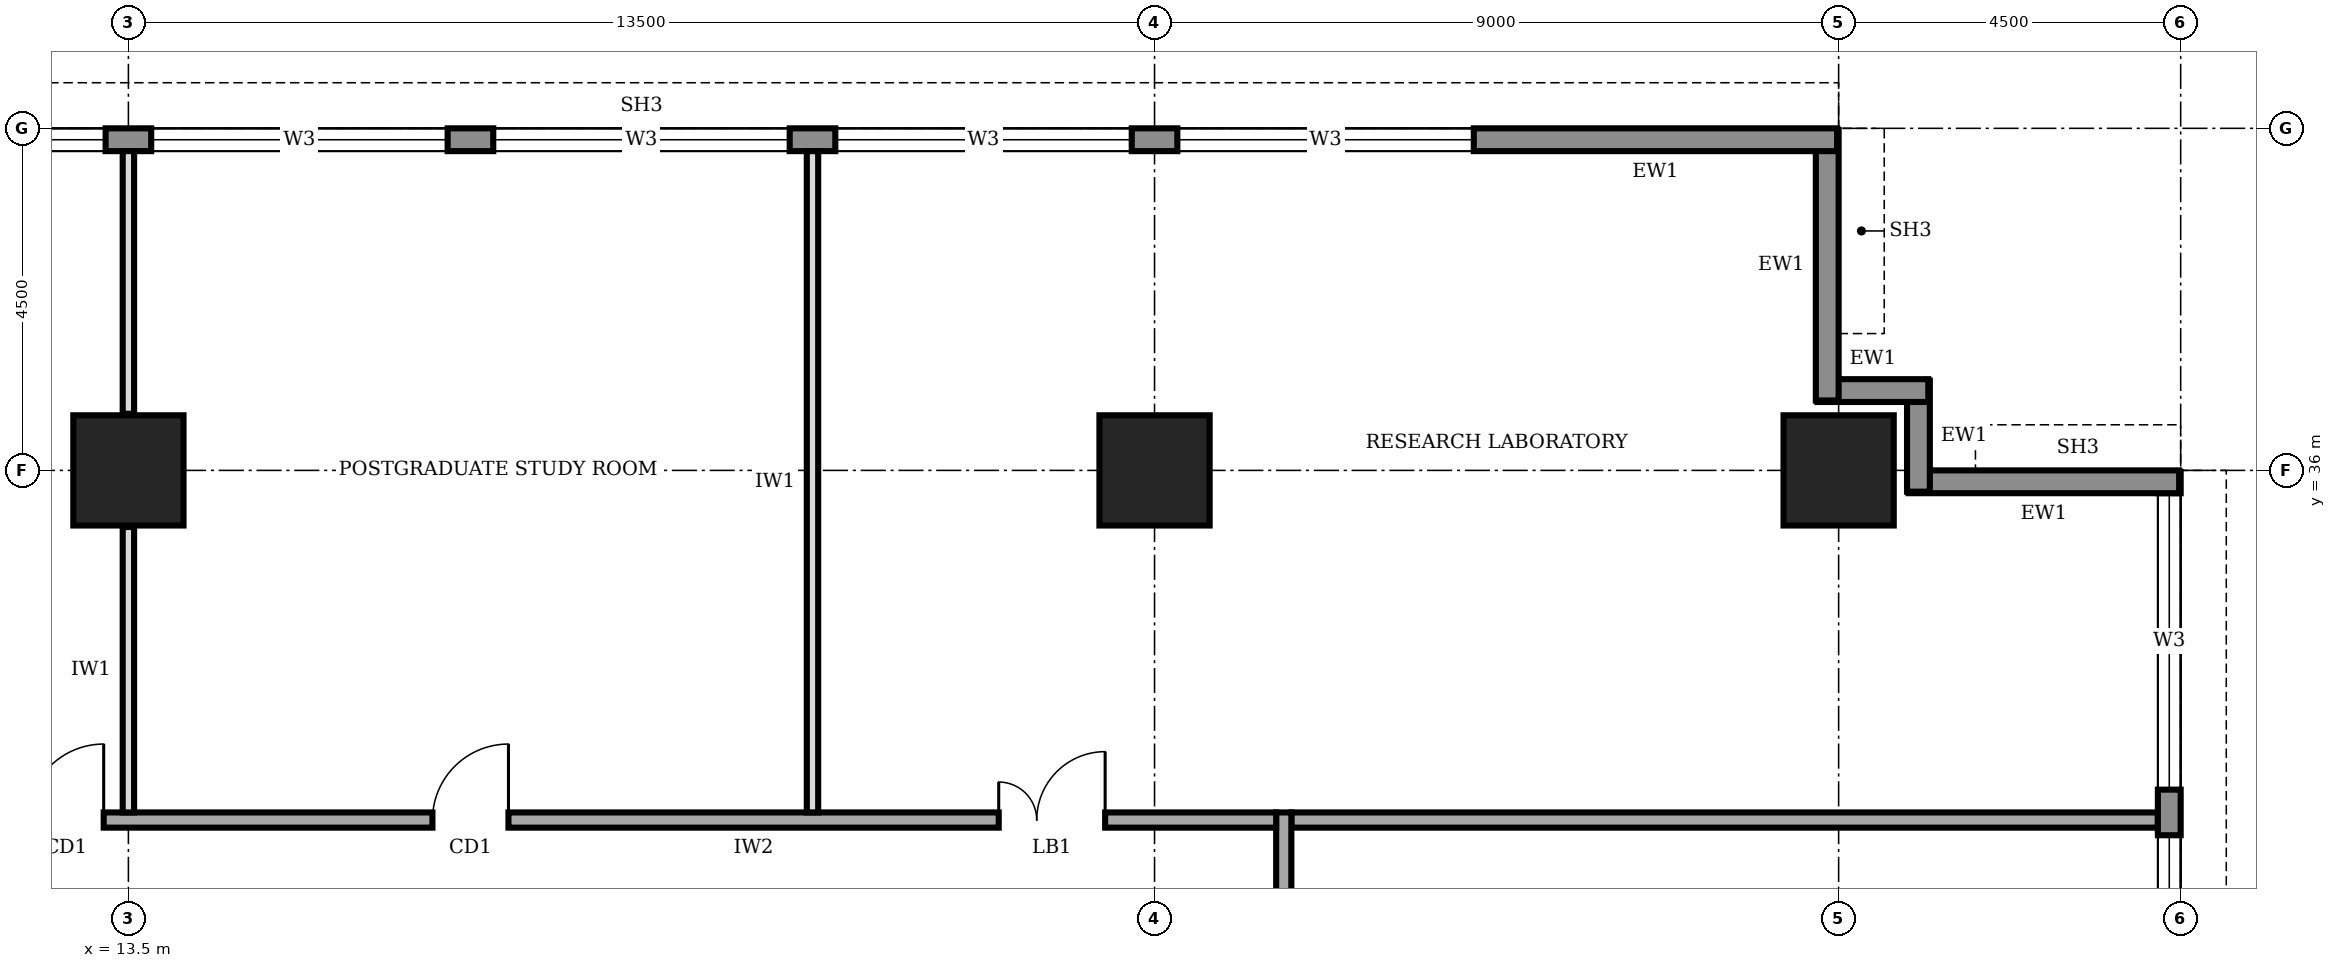
"""IFC4 building model, lengths in metres.
Left out: names, types, materials, properties, quantities, classifications, styles, units other than length and angle.
Written with IfcOpenShell. Run it as: python <this file> out.ifc"""

import sys

from ifc_helpers import new_model, si_unit, direction, frame, frame_2d, origin, origin_2d, place, context, subcontext, project, spatial, rectangle, extrude, element, fill, save


model = new_model("IFC4")
c1 = context("Model", 3, precision=1e-05, world=origin(), true_north=direction((0.0, 1.0)))
c2 = subcontext(c1, "Body", "Model", "MODEL_VIEW")
j1 = project(units=[si_unit("LENGTHUNIT", "METRE"), si_unit("PLANEANGLEUNIT", "RADIAN")], contexts=[c1])
p1 = place(None, origin())
s1 = spatial("IfcSite", under=j1, at=p1, CompositionType="ELEMENT")
p2 = place(p1, origin())
s2 = spatial("IfcBuilding", under=s1, at=p2, CompositionType="ELEMENT")
p3 = place(p2, frame((0.0, 0.0, 253.0)))
s3 = spatial("IfcBuildingStorey", under=s2, at=p3, CompositionType="ELEMENT", Elevation=253.0)
for number, where, z_axis, x_axis in (
    (1, (13.5, 36.0, 0.0), (0.0, 0.0, 1.0), (1.0, 0.0, 0.0)),
    (2, (27.0, 36.0, 0.0), (0.0, 0.0, 1.0), (1.0, 0.0, 0.0)),
    (3, (36.0, 36.0, 0.0), (0.0, 0.0, 1.0), (1.0, 0.0, 0.0)),
):
    element("IfcColumn", number, at=place(p3, frame(where, z_axis=z_axis, x_axis=x_axis)), inside=s3, PredefinedType="COLUMN", context=c2, shape_type="SweptSolid", body=[
        extrude(rectangle(XDim=1.45, YDim=1.45, at=origin_2d()), origin(), (0.0, 0.0, 1.0), 4.0),
    ])
p4 = place(p3, frame((40.35, 4.52, 0.0), z_axis=(0.0, 0.0, 1.0), x_axis=(0.0, 1.0, 0.0)))
e4 = element("IfcWall", 4, at=p4, inside=s3, PredefinedType="STANDARD", context=c2, shape_type="SweptSolid", body=[
    extrude(rectangle(XDim=31.46, YDim=0.3, at=frame_2d((15.73, 0.0))), origin(), (0.0, 0.0, 1.0), 3.75),
])
p5 = place(p4, frame((4.78, 0.0, 0.95)))
e5 = element("IfcOpeningElement", 5, at=p5, cuts=e4, PredefinedType="OPENING", context=c2, shape_type="SweptSolid", body=[
    extrude(rectangle(XDim=3.9, YDim=1.8, at=frame_2d((1.95, 0.9))), frame((0.0, 0.16, 0.0), z_axis=(0.0, -1.0, 0.0), x_axis=(1.0, 0.0, 0.0)), (0.0, 0.0, 1.0), 0.32),
])
p6 = place(p4, frame((9.28, 0.0, 0.95)))
e6 = element("IfcOpeningElement", 6, at=p6, cuts=e4, PredefinedType="OPENING", context=c2, shape_type="SweptSolid", body=[
    extrude(rectangle(XDim=3.9, YDim=1.8, at=frame_2d((1.95, 0.9))), frame((0.0, 0.16, 0.0), z_axis=(0.0, -1.0, 0.0), x_axis=(1.0, 0.0, 0.0)), (0.0, 0.0, 1.0), 0.32),
])
p7 = place(p4, frame((13.78, 0.0, 0.95)))
e7 = element("IfcOpeningElement", 7, at=p7, cuts=e4, PredefinedType="OPENING", context=c2, shape_type="SweptSolid", body=[
    extrude(rectangle(XDim=3.9, YDim=1.8, at=frame_2d((1.95, 0.9))), frame((0.0, 0.16, 0.0), z_axis=(0.0, -1.0, 0.0), x_axis=(1.0, 0.0, 0.0)), (0.0, 0.0, 1.0), 0.32),
])
p8 = place(p4, frame((18.28, 0.0, 0.95)))
e8 = element("IfcOpeningElement", 8, at=p8, cuts=e4, PredefinedType="OPENING", context=c2, shape_type="SweptSolid", body=[
    extrude(rectangle(XDim=3.9, YDim=1.8, at=frame_2d((1.95, 0.9))), frame((0.0, 0.16, 0.0), z_axis=(0.0, -1.0, 0.0), x_axis=(1.0, 0.0, 0.0)), (0.0, 0.0, 1.0), 0.32),
])
p9 = place(p4, frame((22.78, 0.0, 0.95)))
e9 = element("IfcOpeningElement", 9, at=p9, cuts=e4, PredefinedType="OPENING", context=c2, shape_type="SweptSolid", body=[
    extrude(rectangle(XDim=3.9, YDim=1.8, at=frame_2d((1.95, 0.9))), frame((0.0, 0.16, 0.0), z_axis=(0.0, -1.0, 0.0), x_axis=(1.0, 0.0, 0.0)), (0.0, 0.0, 1.0), 0.32),
])
p10 = place(p4, frame((27.28, 0.0, 0.95)))
e10 = element("IfcOpeningElement", 10, at=p10, cuts=e4, PredefinedType="OPENING", context=c2, shape_type="SweptSolid", body=[
    extrude(rectangle(XDim=3.9, YDim=1.8, at=frame_2d((1.95, 0.9))), frame((0.0, 0.16, 0.0), z_axis=(0.0, -1.0, 0.0), x_axis=(1.0, 0.0, 0.0)), (0.0, 0.0, 1.0), 0.32),
])
p11 = place(p3, frame((40.48, 35.85, 0.0), z_axis=(0.0, 0.0, 1.0), x_axis=(-1.0, 0.0, 0.0)))
e11 = element("IfcWall", 11, at=p11, inside=s3, PredefinedType="STANDARD", context=c2, shape_type="SweptSolid", body=[
    extrude(rectangle(XDim=3.56, YDim=0.3, at=frame_2d((1.78, 0.0))), origin(), (0.0, 0.0, 1.0), 2.85),
])
for number, where, z_axis, x_axis in (
    (12, (37.05, 35.72, 0.0), (0.0, 0.0, 1.0), (0.0, 1.0, 0.0)),
    (13, (37.18, 37.05, 0.0), (0.0, 0.0, 1.0), (-1.0, 0.0, 0.0)),
):
    element("IfcWall", number, at=place(p3, frame(where, z_axis=z_axis, x_axis=x_axis)), inside=s3, PredefinedType="STANDARD", context=c2, shape_type="SweptSolid", body=[
        extrude(rectangle(XDim=1.46, YDim=0.3, at=frame_2d((0.73, 0.0))), origin(), (0.0, 0.0, 1.0), 3.75),
    ])
p12 = place(p3, frame((35.85, 36.92, 0.0), z_axis=(0.0, 0.0, 1.0), x_axis=(0.0, 1.0, 0.0)))
e14 = element("IfcWall", 14, at=p12, inside=s3, PredefinedType="STANDARD", context=c2, shape_type="SweptSolid", body=[
    extrude(rectangle(XDim=3.56, YDim=0.3, at=frame_2d((1.78, 0.0))), origin(), (0.0, 0.0, 1.0), 2.85),
])
p13 = place(p3, frame((35.98, 40.35, 0.0), z_axis=(0.0, 0.0, 1.0), x_axis=(-1.0, 0.0, 0.0)))
e15 = element("IfcWall", 15, at=p13, inside=s3, PredefinedType="STANDARD", context=c2, shape_type="SweptSolid", body=[
    extrude(rectangle(XDim=31.46, YDim=0.3, at=frame_2d((15.73, 0.0))), origin(), (0.0, 0.0, 1.0), 3.75),
])
p14 = place(p13, frame((27.28, 0.0, 0.95)))
e16 = element("IfcOpeningElement", 16, at=p14, cuts=e15, PredefinedType="OPENING", context=c2, shape_type="SweptSolid", body=[
    extrude(rectangle(XDim=3.9, YDim=1.8, at=frame_2d((1.95, 0.9))), frame((0.0, 0.16, 0.0), z_axis=(0.0, -1.0, 0.0), x_axis=(1.0, 0.0, 0.0)), (0.0, 0.0, 1.0), 0.32),
])
p15 = place(p13, frame((22.78, 0.0, 0.95)))
e17 = element("IfcOpeningElement", 17, at=p15, cuts=e15, PredefinedType="OPENING", context=c2, shape_type="SweptSolid", body=[
    extrude(rectangle(XDim=3.9, YDim=1.8, at=frame_2d((1.95, 0.9))), frame((0.0, 0.16, 0.0), z_axis=(0.0, -1.0, 0.0), x_axis=(1.0, 0.0, 0.0)), (0.0, 0.0, 1.0), 0.32),
])
p16 = place(p13, frame((18.28, 0.0, 0.95)))
e18 = element("IfcOpeningElement", 18, at=p16, cuts=e15, PredefinedType="OPENING", context=c2, shape_type="SweptSolid", body=[
    extrude(rectangle(XDim=3.9, YDim=1.8, at=frame_2d((1.95, 0.9))), frame((0.0, 0.16, 0.0), z_axis=(0.0, -1.0, 0.0), x_axis=(1.0, 0.0, 0.0)), (0.0, 0.0, 1.0), 0.32),
])
p17 = place(p13, frame((13.78, 0.0, 0.95)))
e19 = element("IfcOpeningElement", 19, at=p17, cuts=e15, PredefinedType="OPENING", context=c2, shape_type="SweptSolid", body=[
    extrude(rectangle(XDim=3.9, YDim=1.8, at=frame_2d((1.95, 0.9))), frame((0.0, 0.16, 0.0), z_axis=(0.0, -1.0, 0.0), x_axis=(1.0, 0.0, 0.0)), (0.0, 0.0, 1.0), 0.32),
])
p18 = place(p13, frame((9.28, 0.0, 0.95)))
e20 = element("IfcOpeningElement", 20, at=p18, cuts=e15, PredefinedType="OPENING", context=c2, shape_type="SweptSolid", body=[
    extrude(rectangle(XDim=3.9, YDim=1.8, at=frame_2d((1.95, 0.9))), frame((0.0, 0.16, 0.0), z_axis=(0.0, -1.0, 0.0), x_axis=(1.0, 0.0, 0.0)), (0.0, 0.0, 1.0), 0.32),
])
p19 = place(p13, frame((4.78, 0.0, 0.95)))
e21 = element("IfcOpeningElement", 21, at=p19, cuts=e15, PredefinedType="OPENING", context=c2, shape_type="SweptSolid", body=[
    extrude(rectangle(XDim=3.9, YDim=1.8, at=frame_2d((1.95, 0.9))), frame((0.0, 0.16, 0.0), z_axis=(0.0, -1.0, 0.0), x_axis=(1.0, 0.0, 0.0)), (0.0, 0.0, 1.0), 0.32),
])
p20 = place(p3, frame((28.7, 9.2, 0.0), z_axis=(0.0, 0.0, 1.0), x_axis=(0.0, 1.0, 0.0)))
e22 = element("IfcWall", 22, at=p20, inside=s3, PredefinedType="SOLIDWALL", context=c2, shape_type="SweptSolid", body=[
    extrude(rectangle(XDim=22.3, YDim=0.2, at=frame_2d((11.15, 0.0))), origin(), (0.0, 0.0, 1.0), 3.75),
])
p21 = place(p20, frame((1.55, 0.0, 0.0)))
e23 = element("IfcOpeningElement", 23, at=p21, cuts=e22, PredefinedType="OPENING", context=c2, shape_type="SweptSolid", body=[
    extrude(rectangle(XDim=1.0, YDim=2.1, at=frame_2d((0.5, 1.05))), frame((0.0, 0.11, 0.0), z_axis=(0.0, -1.0, 0.0), x_axis=(1.0, 0.0, 0.0)), (0.0, 0.0, 1.0), 0.22),
])
p22 = place(p20, frame((6.05, 0.0, 0.0)))
e24 = element("IfcOpeningElement", 24, at=p22, cuts=e22, PredefinedType="OPENING", context=c2, shape_type="SweptSolid", body=[
    extrude(rectangle(XDim=1.0, YDim=2.1, at=frame_2d((0.5, 1.05))), frame((0.0, 0.11, 0.0), z_axis=(0.0, -1.0, 0.0), x_axis=(1.0, 0.0, 0.0)), (0.0, 0.0, 1.0), 0.22),
])
p23 = place(p20, frame((10.55, 0.0, 0.0)))
e25 = element("IfcOpeningElement", 25, at=p23, cuts=e22, PredefinedType="OPENING", context=c2, shape_type="SweptSolid", body=[
    extrude(rectangle(XDim=1.0, YDim=2.1, at=frame_2d((0.5, 1.05))), frame((0.0, 0.11, 0.0), z_axis=(0.0, -1.0, 0.0), x_axis=(1.0, 0.0, 0.0)), (0.0, 0.0, 1.0), 0.22),
])
p24 = place(p20, frame((15.05, 0.0, 0.0)))
e26 = element("IfcOpeningElement", 26, at=p24, cuts=e22, PredefinedType="OPENING", context=c2, shape_type="SweptSolid", body=[
    extrude(rectangle(XDim=1.0, YDim=2.1, at=frame_2d((0.5, 1.05))), frame((0.0, 0.11, 0.0), z_axis=(0.0, -1.0, 0.0), x_axis=(1.0, 0.0, 0.0)), (0.0, 0.0, 1.0), 0.22),
])
p25 = place(p20, frame((19.55, 0.0, 0.0)))
e27 = element("IfcOpeningElement", 27, at=p25, cuts=e22, PredefinedType="OPENING", context=c2, shape_type="SweptSolid", body=[
    extrude(rectangle(XDim=1.0, YDim=2.1, at=frame_2d((0.5, 1.05))), frame((0.0, 0.11, 0.0), z_axis=(0.0, -1.0, 0.0), x_axis=(1.0, 0.0, 0.0)), (0.0, 0.0, 1.0), 0.22),
])
p26 = place(p3, frame((28.6, 31.4, 0.0), z_axis=(0.0, 0.0, 1.0), x_axis=(-1.0, 0.0, 0.0)))
e28 = element("IfcWall", 28, at=p26, inside=s3, PredefinedType="SOLIDWALL", context=c2, shape_type="SweptSolid", body=[
    extrude(rectangle(XDim=16.9, YDim=0.2, at=frame_2d((8.45, 0.0))), origin(), (0.0, 0.0, 1.0), 3.75),
])
p27 = place(p26, frame((15.425, 0.0, 0.0)))
e29 = element("IfcOpeningElement", 29, at=p27, cuts=e28, PredefinedType="OPENING", context=c2, shape_type="SweptSolid", body=[
    extrude(rectangle(XDim=1.0, YDim=2.1, at=frame_2d((0.5, 1.05))), frame((0.0, 0.11, 0.0), z_axis=(0.0, -1.0, 0.0), x_axis=(1.0, 0.0, 0.0)), (0.0, 0.0, 1.0), 0.22),
])
p28 = place(p26, frame((10.1, 0.0, 0.0)))
e30 = element("IfcOpeningElement", 30, at=p28, cuts=e28, PredefinedType="OPENING", context=c2, shape_type="SweptSolid", body=[
    extrude(rectangle(XDim=1.0, YDim=2.1, at=frame_2d((0.5, 1.05))), frame((0.0, 0.11, 0.0), z_axis=(0.0, -1.0, 0.0), x_axis=(1.0, 0.0, 0.0)), (0.0, 0.0, 1.0), 0.22),
])
p29 = place(p26, frame((2.25, 0.0, 0.0)))
e31 = element("IfcOpeningElement", 31, at=p29, cuts=e28, PredefinedType="OPENING", context=c2, shape_type="SweptSolid", body=[
    extrude(rectangle(XDim=1.4, YDim=2.1, at=frame_2d((0.7, 1.05))), frame((0.0, 0.11, 0.0), z_axis=(0.0, -1.0, 0.0), x_axis=(1.0, 0.0, 0.0)), (0.0, 0.0, 1.0), 0.22),
])
p30 = place(p3, frame((28.8, 31.4, 0.0), z_axis=(0.0, 0.0, 1.0), x_axis=(1.0, 0.0, 0.0)))
e32 = element("IfcWall", 32, at=p30, inside=s3, PredefinedType="SOLIDWALL", context=c2, shape_type="SweptSolid", body=[
    extrude(rectangle(XDim=11.4, YDim=0.2, at=frame_2d((5.7, 0.0))), origin(), (0.0, 0.0, 1.0), 3.75),
])
p31 = place(p3, frame((13.5, 31.5, 0.0), z_axis=(0.0, 0.0, 1.0), x_axis=(0.0, 1.0, 0.0)))
e33 = element("IfcWall", 33, at=p31, inside=s3, PredefinedType="PARTITIONING", context=c2, shape_type="SweptSolid", body=[
    extrude(rectangle(XDim=3.755, YDim=0.15, at=frame_2d((1.877, 0.0))), origin(), (0.0, 0.0, 1.0), 2.85),
])
p32 = place(p3, frame((13.5, 36.745, 0.0), z_axis=(0.0, 0.0, 1.0), x_axis=(0.0, 1.0, 0.0)))
e34 = element("IfcWall", 34, at=p32, inside=s3, PredefinedType="PARTITIONING", context=c2, shape_type="SweptSolid", body=[
    extrude(rectangle(XDim=3.455, YDim=0.15, at=frame_2d((1.728, 0.0))), origin(), (0.0, 0.0, 1.0), 2.85),
])
p33 = place(p3, frame((22.5, 31.5, 0.0), z_axis=(0.0, 0.0, 1.0), x_axis=(0.0, 1.0, 0.0)))
e35 = element("IfcWall", 35, at=p33, inside=s3, PredefinedType="PARTITIONING", context=c2, shape_type="SweptSolid", body=[
    extrude(rectangle(XDim=8.7, YDim=0.15, at=frame_2d((4.35, 0.0))), origin(), (0.0, 0.0, 1.0), 3.75),
])
p34 = place(p9, origin())
e36 = element("IfcWindow", 36, at=p34, inside=s3, PartitioningType="SINGLE_PANEL", PredefinedType="WINDOW", context=c2, shape_type="SweptSolid", body=[
    extrude(rectangle(XDim=3.9, YDim=1.8, at=frame_2d((1.95, 0.9))), frame((0.0, 0.03, 0.0), z_axis=(0.0, -1.0, 0.0), x_axis=(1.0, 0.0, 0.0)), (0.0, 0.0, 1.0), 0.06),
])
fill(e9, e36)
p35 = place(p10, origin())
e37 = element("IfcWindow", 37, at=p35, inside=s3, PartitioningType="SINGLE_PANEL", PredefinedType="WINDOW", context=c2, shape_type="SweptSolid", body=[
    extrude(rectangle(XDim=3.9, YDim=1.8, at=frame_2d((1.95, 0.9))), frame((0.0, 0.03, 0.0), z_axis=(0.0, -1.0, 0.0), x_axis=(1.0, 0.0, 0.0)), (0.0, 0.0, 1.0), 0.06),
])
fill(e10, e37)
p36 = place(p15, origin())
e38 = element("IfcWindow", 38, at=p36, inside=s3, PartitioningType="SINGLE_PANEL", PredefinedType="WINDOW", context=c2, shape_type="SweptSolid", body=[
    extrude(rectangle(XDim=3.9, YDim=1.8, at=frame_2d((1.95, 0.9))), frame((0.0, 0.03, 0.0), z_axis=(0.0, -1.0, 0.0), x_axis=(1.0, 0.0, 0.0)), (0.0, 0.0, 1.0), 0.06),
])
fill(e17, e38)
p37 = place(p16, origin())
e39 = element("IfcWindow", 39, at=p37, inside=s3, PartitioningType="SINGLE_PANEL", PredefinedType="WINDOW", context=c2, shape_type="SweptSolid", body=[
    extrude(rectangle(XDim=3.9, YDim=1.8, at=frame_2d((1.95, 0.9))), frame((0.0, 0.03, 0.0), z_axis=(0.0, -1.0, 0.0), x_axis=(1.0, 0.0, 0.0)), (0.0, 0.0, 1.0), 0.06),
])
fill(e18, e39)
p38 = place(p17, origin())
e40 = element("IfcWindow", 40, at=p38, inside=s3, PartitioningType="SINGLE_PANEL", PredefinedType="WINDOW", context=c2, shape_type="SweptSolid", body=[
    extrude(rectangle(XDim=3.9, YDim=1.8, at=frame_2d((1.95, 0.9))), frame((0.0, 0.03, 0.0), z_axis=(0.0, -1.0, 0.0), x_axis=(1.0, 0.0, 0.0)), (0.0, 0.0, 1.0), 0.06),
])
fill(e19, e40)
p39 = place(p18, origin())
e41 = element("IfcWindow", 41, at=p39, inside=s3, PartitioningType="SINGLE_PANEL", PredefinedType="WINDOW", context=c2, shape_type="SweptSolid", body=[
    extrude(rectangle(XDim=3.9, YDim=1.8, at=frame_2d((1.95, 0.9))), frame((0.0, 0.03, 0.0), z_axis=(0.0, -1.0, 0.0), x_axis=(1.0, 0.0, 0.0)), (0.0, 0.0, 1.0), 0.06),
])
fill(e20, e41)
p40 = place(p19, origin())
e42 = element("IfcWindow", 42, at=p40, inside=s3, PartitioningType="SINGLE_PANEL", PredefinedType="WINDOW", context=c2, shape_type="SweptSolid", body=[
    extrude(rectangle(XDim=3.9, YDim=1.8, at=frame_2d((1.95, 0.9))), frame((0.0, 0.03, 0.0), z_axis=(0.0, -1.0, 0.0), x_axis=(1.0, 0.0, 0.0)), (0.0, 0.0, 1.0), 0.06),
])
fill(e21, e42)
p41 = place(p27, frame((1.0, 0.0, 0.0), z_axis=(0.0, 0.0, 1.0), x_axis=(-1.0, 0.0, 0.0)))
e43 = element("IfcDoor", 43, at=p41, inside=s3, OperationType="SINGLE_SWING_RIGHT", PredefinedType="DOOR", context=c2, shape_type="SweptSolid", body=[
    extrude(rectangle(XDim=1.0, YDim=2.1, at=frame_2d((0.5, 1.05))), frame((0.0, 0.025, 0.0), z_axis=(0.0, -1.0, 0.0), x_axis=(1.0, 0.0, 0.0)), (0.0, 0.0, 1.0), 0.05),
])
fill(e29, e43)
p42 = place(p28, frame((1.0, 0.0, 0.0), z_axis=(0.0, 0.0, 1.0), x_axis=(-1.0, 0.0, 0.0)))
e44 = element("IfcDoor", 44, at=p42, inside=s3, OperationType="SINGLE_SWING_RIGHT", PredefinedType="DOOR", context=c2, shape_type="SweptSolid", body=[
    extrude(rectangle(XDim=1.0, YDim=2.1, at=frame_2d((0.5, 1.05))), frame((0.0, 0.025, 0.0), z_axis=(0.0, -1.0, 0.0), x_axis=(1.0, 0.0, 0.0)), (0.0, 0.0, 1.0), 0.05),
])
fill(e30, e44)
p43 = place(p29, frame((1.4, 0.0, 0.0), z_axis=(0.0, 0.0, 1.0), x_axis=(-1.0, 0.0, 0.0)))
e45 = element("IfcDoor", 45, at=p43, inside=s3, OperationType="DOUBLE_DOOR_SINGLE_SWING", PredefinedType="DOOR", context=c2, shape_type="SweptSolid", body=[
    extrude(rectangle(XDim=1.4, YDim=2.1, at=frame_2d((0.7, 1.05))), frame((0.0, 0.025, 0.0), z_axis=(0.0, -1.0, 0.0), x_axis=(1.0, 0.0, 0.0)), (0.0, 0.0, 1.0), 0.05),
])
fill(e31, e45)
save(model, sys.argv[1])
